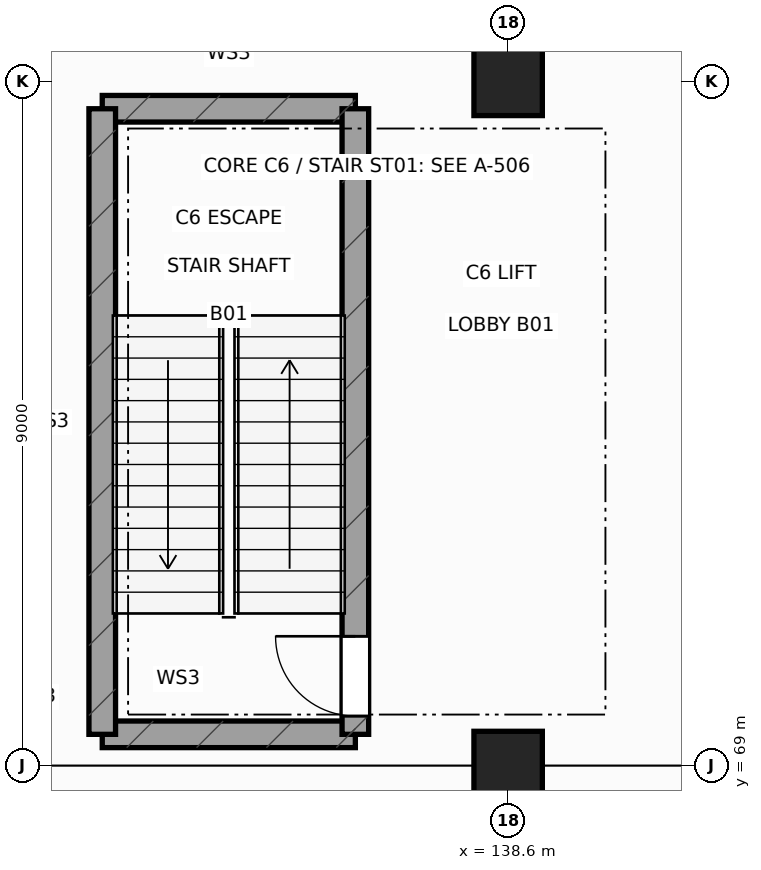
"""IFC4 building model, lengths in metres.
Left out: names, types, materials, properties, quantities, classifications, styles, units other than length and angle.
Written with IfcOpenShell. Run it as: python <this file> out.ifc"""

import sys

from ifc_helpers import new_model, si_unit, direction, frame, frame_2d, origin, origin_2d, place, context, subcontext, project, spatial, rectangle, extrude, element, fill, save


model = new_model("IFC4")
c1 = context("Model", 3, precision=1e-05, world=origin(), true_north=direction((0.0, 1.0)))
c2 = subcontext(c1, "Body", "Model", "MODEL_VIEW")
j1 = project(units=[si_unit("LENGTHUNIT", "METRE"), si_unit("PLANEANGLEUNIT", "RADIAN")], contexts=[c1])
p1 = place(None, origin())
s1 = spatial("IfcSite", under=j1, at=p1, CompositionType="ELEMENT")
p2 = place(p1, origin())
s2 = spatial("IfcBuilding", under=s1, at=p2, CompositionType="ELEMENT")
p3 = place(p2, frame((0.0, 0.0, -5.4)))
s3 = spatial("IfcBuildingStorey", under=s2, at=p3, CompositionType="ELEMENT", Elevation=-5.4)
for number, where, z_axis, x_axis in (
    (1, (138.6, 69.0, 0.0), (0.0, 0.0, 1.0), (1.0, 0.0, 0.0)),
    (2, (138.6, 78.0, 0.0), (0.0, 0.0, 1.0), (1.0, 0.0, 0.0)),
):
    element("IfcColumn", number, at=place(p3, frame(where, z_axis=z_axis, x_axis=x_axis)), inside=s3, PredefinedType="COLUMN", context=c2, shape_type="SweptSolid", body=[
        extrude(rectangle(XDim=0.9, YDim=0.9, at=origin_2d()), origin(), (0.0, 0.0, 1.0), 5.4),
    ])
for number, where, z_axis, x_axis in (
    (3, (133.26, 69.41, 0.0), (0.0, 0.0, 1.0), (1.0, 0.0, 0.0)),
    (4, (133.26, 77.64, 0.0), (0.0, 0.0, 1.0), (1.0, 0.0, 0.0)),
):
    element("IfcWall", number, at=place(p3, frame(where, z_axis=z_axis, x_axis=x_axis)), inside=s3, PredefinedType="SHEAR", context=c2, shape_type="SweptSolid", body=[
        extrude(rectangle(XDim=3.33, YDim=0.35, at=frame_2d((1.665, 0.0))), origin(), (0.0, 0.0, 1.0), 5.08),
    ])
p4 = place(p3, frame((133.26, 69.41, 0.0), z_axis=(0.0, 0.0, 1.0), x_axis=(0.0, 1.0, 0.0)))
e5 = element("IfcWall", 5, at=p4, inside=s3, PredefinedType="SHEAR", context=c2, shape_type="SweptSolid", body=[
    extrude(rectangle(XDim=8.23, YDim=0.35, at=frame_2d((4.115, 0.0))), origin(), (0.0, 0.0, 1.0), 5.08),
])
p5 = place(p3, frame((136.59, 69.41, 0.0), z_axis=(0.0, 0.0, 1.0), x_axis=(0.0, 1.0, 0.0)))
e6 = element("IfcWall", 6, at=p5, inside=s3, PredefinedType="SHEAR", context=c2, shape_type="SweptSolid", body=[
    extrude(rectangle(XDim=8.23, YDim=0.35, at=frame_2d((4.115, 0.0))), origin(), (0.0, 0.0, 1.0), 5.08),
])
p6 = place(p5, frame((0.24, 0.0, 0.0)))
e7 = element("IfcOpeningElement", 7, at=p6, cuts=e6, PredefinedType="OPENING", context=c2, shape_type="SweptSolid", body=[
    extrude(rectangle(XDim=1.05, YDim=2.18, at=frame_2d((0.525, 1.09))), frame((0.0, 0.185, 0.0), z_axis=(0.0, -1.0, 0.0), x_axis=(1.0, 0.0, 0.0)), (0.0, 0.0, 1.0), 0.37),
])
p7 = place(p6, origin())
e8 = element("IfcDoor", 8, at=p7, inside=s3, OperationType="SINGLE_SWING_RIGHT", PredefinedType="DOOR", context=c2, shape_type="SweptSolid", body=[
    extrude(rectangle(XDim=1.05, YDim=2.18, at=frame_2d((0.525, 1.09))), frame((0.0, 0.025, 0.0), z_axis=(0.0, -1.0, 0.0), x_axis=(1.0, 0.0, 0.0)), (0.0, 0.0, 1.0), 0.05),
])
fill(e7, e8)
save(model, sys.argv[1])
